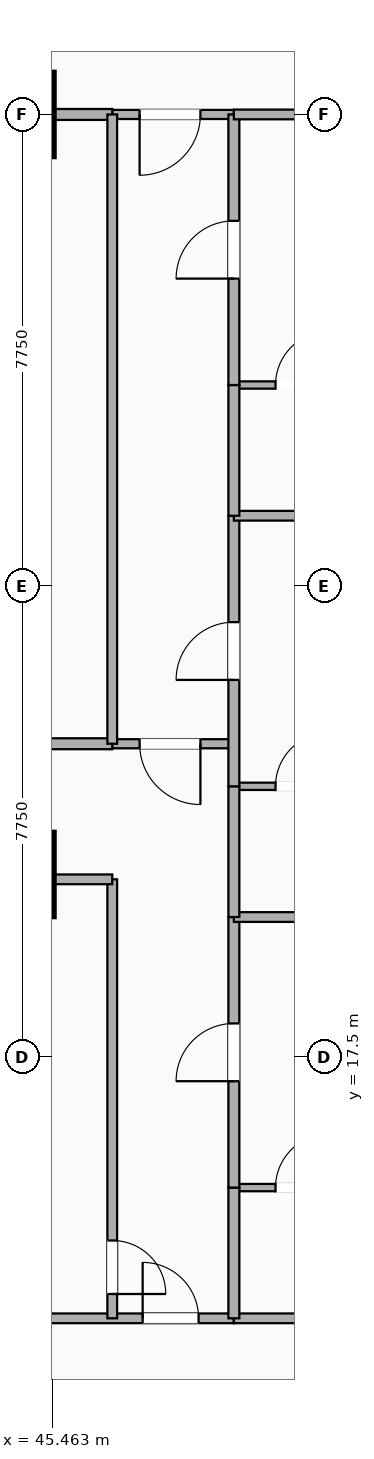
"""IFC4 building model, lengths in metres.
Left out: names, types, materials, properties, quantities, classifications, styles, units other than length and angle.
Written with IfcOpenShell. Run it as: python <this file> out.ifc"""

import sys

from ifc_helpers import new_model, si_unit, direction, frame, frame_2d, origin, origin_2d, place, context, subcontext, project, spatial, rectangle, extrude, element, fill, save


model = new_model("IFC4")
c1 = context("Model", 3, precision=1e-05, world=origin(), true_north=direction((0.0, 1.0)))
c2 = subcontext(c1, "Body", "Model", "MODEL_VIEW")
j1 = project(units=[si_unit("LENGTHUNIT", "METRE"), si_unit("PLANEANGLEUNIT", "RADIAN")], contexts=[c1])
p1 = place(None, origin())
s1 = spatial("IfcSite", under=j1, at=p1, CompositionType="ELEMENT")
p2 = place(p1, origin())
s2 = spatial("IfcBuilding", under=s1, at=p2, CompositionType="ELEMENT")
p3 = place(p2, frame((0.0, 0.0, 71.9)))
s3 = spatial("IfcBuildingStorey", under=s2, at=p3, CompositionType="ELEMENT", Elevation=71.9)
for number, where, z_axis, x_axis in (
    (1, (44.8, 20.5, -0.28), (0.0, 0.0, 1.0), (1.0, 0.0, 0.0)),
    (2, (44.8, 33.0, -0.28), (0.0, 0.0, 1.0), (1.0, 0.0, 0.0)),
):
    element("IfcColumn", number, at=place(p3, frame(where, z_axis=z_axis, x_axis=x_axis)), inside=s3, PredefinedType="COLUMN", context=c2, shape_type="SweptSolid", body=[
        extrude(rectangle(XDim=1.4, YDim=1.4, at=origin_2d()), origin(), (0.0, 0.0, 1.0), 3.46),
    ])
p4 = place(p3, frame((44.8, 13.2, 0.0), z_axis=(0.0, 0.0, 1.0), x_axis=(1.0, 0.0, 0.0)))
e3 = element("IfcWall", 3, at=p4, inside=s3, PredefinedType="PARTITIONING", context=c2, shape_type="SweptSolid", body=[
    extrude(rectangle(XDim=3.65, YDim=0.16, at=frame_2d((1.825, 0.0))), origin(), (0.0, 0.0, 1.0), 2.47),
])
p5 = place(p4, frame((3.07, 0.0, 0.0), z_axis=(0.0, 0.0, 1.0), x_axis=(-1.0, 0.0, 0.0)))
e4 = element("IfcOpeningElement", 4, at=p5, cuts=e3, PredefinedType="OPENING", context=c2, shape_type="SweptSolid", body=[
    extrude(rectangle(XDim=0.92, YDim=2.08, at=frame_2d((0.46, 1.04))), frame((0.0, 0.09, 0.0), z_axis=(0.0, -1.0, 0.0), x_axis=(1.0, 0.0, 0.0)), (0.0, 0.0, 1.0), 0.18),
])
p6 = place(p3, frame((46.45, 13.2, 0.0), z_axis=(0.0, 0.0, 1.0), x_axis=(0.0, 1.0, 0.0)))
e5 = element("IfcWall", 5, at=p6, inside=s3, PredefinedType="PARTITIONING", context=c2, shape_type="SweptSolid", body=[
    extrude(rectangle(XDim=7.22, YDim=0.16, at=frame_2d((3.61, 0.0))), origin(), (0.0, 0.0, 1.0), 2.47),
])
p7 = place(p6, frame((0.4, 0.0, 0.0)))
e6 = element("IfcOpeningElement", 6, at=p7, cuts=e5, PredefinedType="OPENING", context=c2, shape_type="SweptSolid", body=[
    extrude(rectangle(XDim=0.88, YDim=2.08, at=frame_2d((0.44, 1.04))), frame((0.0, 0.09, 0.0), z_axis=(0.0, -1.0, 0.0), x_axis=(1.0, 0.0, 0.0)), (0.0, 0.0, 1.0), 0.18),
])
p8 = place(p3, frame((44.8, 20.42, 0.0), z_axis=(0.0, 0.0, 1.0), x_axis=(1.0, 0.0, 0.0)))
e7 = element("IfcWall", 7, at=p8, inside=s3, PredefinedType="PARTITIONING", context=c2, shape_type="SweptSolid", body=[
    extrude(rectangle(XDim=1.65, YDim=0.16, at=frame_2d((0.825, 0.0))), origin(), (0.0, 0.0, 1.0), 2.47),
])
p9 = place(p3, frame((46.45, 22.65, 0.0), z_axis=(0.0, 0.0, 1.0), x_axis=(1.0, 0.0, 0.0)))
e8 = element("IfcWall", 8, at=p9, inside=s3, PredefinedType="PARTITIONING", context=c2, shape_type="SweptSolid", body=[
    extrude(rectangle(XDim=2.0, YDim=0.15, at=frame_2d((1.0, 0.0))), origin(), (0.0, 0.0, 1.0), 3.18),
])
p10 = place(p9, frame((0.45, 0.0, 0.0)))
e9 = element("IfcOpeningElement", 9, at=p10, cuts=e8, PredefinedType="OPENING", context=c2, shape_type="SweptSolid", body=[
    extrude(rectangle(XDim=1.0, YDim=2.15, at=frame_2d((0.5, 1.075))), frame((0.0, 0.085, 0.0), z_axis=(0.0, -1.0, 0.0), x_axis=(1.0, 0.0, 0.0)), (0.0, 0.0, 1.0), 0.17),
])
p11 = place(p3, frame((46.45, 33.0, 0.0), z_axis=(0.0, 0.0, 1.0), x_axis=(1.0, 0.0, 0.0)))
e10 = element("IfcWall", 10, at=p11, inside=s3, PredefinedType="PARTITIONING", context=c2, shape_type="SweptSolid", body=[
    extrude(rectangle(XDim=2.0, YDim=0.15, at=frame_2d((1.0, 0.0))), origin(), (0.0, 0.0, 1.0), 2.47),
])
p12 = place(p11, frame((0.45, 0.0, 0.0)))
e11 = element("IfcOpeningElement", 11, at=p12, cuts=e10, PredefinedType="OPENING", context=c2, shape_type="SweptSolid", body=[
    extrude(rectangle(XDim=1.0, YDim=2.15, at=frame_2d((0.5, 1.075))), frame((0.0, 0.085, 0.0), z_axis=(0.0, -1.0, 0.0), x_axis=(1.0, 0.0, 0.0)), (0.0, 0.0, 1.0), 0.17),
])
p13 = place(p3, frame((26.5, 22.65, 0.0), z_axis=(0.0, 0.0, 1.0), x_axis=(1.0, 0.0, 0.0)))
e12 = element("IfcWall", 12, at=p13, inside=s3, PredefinedType="PARTITIONING", context=c2, shape_type="SweptSolid", body=[
    extrude(rectangle(XDim=19.95, YDim=0.18, at=frame_2d((9.975, 0.0))), origin(), (0.0, 0.0, 1.0), 2.47),
])
p14 = place(p13, frame((9.5, 0.0, 0.0)))
e13 = element("IfcOpeningElement", 13, at=p14, cuts=e12, PredefinedType="OPENING", context=c2, shape_type="SweptSolid", body=[
    extrude(rectangle(XDim=0.95, YDim=2.15, at=frame_2d((0.475, 1.075))), frame((0.0, 0.1, 0.0), z_axis=(0.0, -1.0, 0.0), x_axis=(1.0, 0.0, 0.0)), (0.0, 0.0, 1.0), 0.2),
])
p15 = place(p3, frame((26.5, 33.0, 0.0), z_axis=(0.0, 0.0, 1.0), x_axis=(1.0, 0.0, 0.0)))
e14 = element("IfcWall", 14, at=p15, inside=s3, PredefinedType="PARTITIONING", context=c2, shape_type="SweptSolid", body=[
    extrude(rectangle(XDim=19.95, YDim=0.18, at=frame_2d((9.975, 0.0))), origin(), (0.0, 0.0, 1.0), 2.47),
])
p16 = place(p3, frame((46.45, 22.65, 0.0), z_axis=(0.0, 0.0, 1.0), x_axis=(0.0, 1.0, 0.0)))
e15 = element("IfcWall", 15, at=p16, inside=s3, PredefinedType="PARTITIONING", context=c2, shape_type="SweptSolid", body=[
    extrude(rectangle(XDim=10.35, YDim=0.16, at=frame_2d((5.175, 0.0))), origin(), (0.0, 0.0, 1.0), 2.47),
])
p17 = place(p3, frame((48.45, 13.2, 0.0), z_axis=(0.0, 0.0, 1.0), x_axis=(1.0, 0.0, 0.0)))
e16 = element("IfcWall", 16, at=p17, inside=s3, PredefinedType="PARTITIONING", context=c2, shape_type="SweptSolid", body=[
    extrude(rectangle(XDim=13.23, YDim=0.16, at=frame_2d((6.615, 0.0))), origin(), (0.0, 0.0, 1.0), 2.543),
])
p18 = place(p3, frame((48.45, 15.35, 0.0), z_axis=(0.0, 0.0, 1.0), x_axis=(1.0, 0.0, 0.0)))
e17 = element("IfcWall", 17, at=p18, inside=s3, PredefinedType="PARTITIONING", context=c2, shape_type="SweptSolid", body=[
    extrude(rectangle(XDim=2.25, YDim=0.12, at=frame_2d((1.125, 0.0))), origin(), (0.0, 0.0, 1.0), 3.18),
])
p19 = place(p18, frame((1.565, 0.0, 0.0), z_axis=(0.0, 0.0, 1.0), x_axis=(-1.0, 0.0, 0.0)))
e18 = element("IfcOpeningElement", 18, at=p19, cuts=e17, PredefinedType="OPENING", context=c2, shape_type="SweptSolid", body=[
    extrude(rectangle(XDim=0.88, YDim=2.08, at=frame_2d((0.44, 1.04))), frame((0.0, 0.07, 0.0), z_axis=(0.0, -1.0, 0.0), x_axis=(1.0, 0.0, 0.0)), (0.0, 0.0, 1.0), 0.14),
])
p20 = place(p3, frame((48.45, 13.2, 0.0), z_axis=(0.0, 0.0, 1.0), x_axis=(0.0, 1.0, 0.0)))
e19 = element("IfcWall", 19, at=p20, inside=s3, PredefinedType="PARTITIONING", context=c2, shape_type="SweptSolid", body=[
    extrude(rectangle(XDim=2.15, YDim=0.18, at=frame_2d((1.075, 0.0))), origin(), (0.0, 0.0, 1.0), 2.862),
])
p21 = place(p3, frame((48.45, 15.35, 0.0), z_axis=(0.0, 0.0, 1.0), x_axis=(0.0, 1.0, 0.0)))
e20 = element("IfcWall", 20, at=p21, inside=s3, PredefinedType="PARTITIONING", context=c2, shape_type="SweptSolid", body=[
    extrude(rectangle(XDim=4.45, YDim=0.18, at=frame_2d((2.225, 0.0))), origin(), (0.0, 0.0, 1.0), 2.862),
])
p22 = place(p21, frame((2.7, 0.0, 0.0), z_axis=(0.0, 0.0, 1.0), x_axis=(-1.0, 0.0, 0.0)))
e21 = element("IfcOpeningElement", 21, at=p22, cuts=e20, PredefinedType="OPENING", context=c2, shape_type="SweptSolid", body=[
    extrude(rectangle(XDim=0.95, YDim=2.15, at=frame_2d((0.475, 1.075))), frame((0.0, 0.1, 0.0), z_axis=(0.0, -1.0, 0.0), x_axis=(1.0, 0.0, 0.0)), (0.0, 0.0, 1.0), 0.2),
])
p23 = place(p3, frame((48.45, 19.8, 0.0), z_axis=(0.0, 0.0, 1.0), x_axis=(1.0, 0.0, 0.0)))
e22 = element("IfcWall", 22, at=p23, inside=s3, PredefinedType="PARTITIONING", context=c2, shape_type="SweptSolid", body=[
    extrude(rectangle(XDim=13.23, YDim=0.16, at=frame_2d((6.615, 0.0))), origin(), (0.0, 0.0, 1.0), 2.543),
])
p24 = place(p3, frame((48.45, 21.95, 0.0), z_axis=(0.0, 0.0, 1.0), x_axis=(1.0, 0.0, 0.0)))
e23 = element("IfcWall", 23, at=p24, inside=s3, PredefinedType="PARTITIONING", context=c2, shape_type="SweptSolid", body=[
    extrude(rectangle(XDim=2.25, YDim=0.12, at=frame_2d((1.125, 0.0))), origin(), (0.0, 0.0, 1.0), 3.18),
])
p25 = place(p24, frame((1.565, 0.0, 0.0), z_axis=(0.0, 0.0, 1.0), x_axis=(-1.0, 0.0, 0.0)))
e24 = element("IfcOpeningElement", 24, at=p25, cuts=e23, PredefinedType="OPENING", context=c2, shape_type="SweptSolid", body=[
    extrude(rectangle(XDim=0.88, YDim=2.08, at=frame_2d((0.44, 1.04))), frame((0.0, 0.07, 0.0), z_axis=(0.0, -1.0, 0.0), x_axis=(1.0, 0.0, 0.0)), (0.0, 0.0, 1.0), 0.14),
])
p26 = place(p3, frame((48.45, 19.8, 0.0), z_axis=(0.0, 0.0, 1.0), x_axis=(0.0, 1.0, 0.0)))
e25 = element("IfcWall", 25, at=p26, inside=s3, PredefinedType="PARTITIONING", context=c2, shape_type="SweptSolid", body=[
    extrude(rectangle(XDim=2.15, YDim=0.18, at=frame_2d((1.075, 0.0))), origin(), (0.0, 0.0, 1.0), 2.47),
])
p27 = place(p3, frame((48.45, 21.95, 0.0), z_axis=(0.0, 0.0, 1.0), x_axis=(0.0, 1.0, 0.0)))
e26 = element("IfcWall", 26, at=p27, inside=s3, PredefinedType="PARTITIONING", context=c2, shape_type="SweptSolid", body=[
    extrude(rectangle(XDim=4.45, YDim=0.18, at=frame_2d((2.225, 0.0))), origin(), (0.0, 0.0, 1.0), 2.748),
])
p28 = place(p27, frame((2.7, 0.0, 0.0), z_axis=(0.0, 0.0, 1.0), x_axis=(-1.0, 0.0, 0.0)))
e27 = element("IfcOpeningElement", 27, at=p28, cuts=e26, PredefinedType="OPENING", context=c2, shape_type="SweptSolid", body=[
    extrude(rectangle(XDim=0.95, YDim=2.15, at=frame_2d((0.475, 1.075))), frame((0.0, 0.1, 0.0), z_axis=(0.0, -1.0, 0.0), x_axis=(1.0, 0.0, 0.0)), (0.0, 0.0, 1.0), 0.2),
])
p29 = place(p3, frame((48.45, 26.4, 0.0), z_axis=(0.0, 0.0, 1.0), x_axis=(1.0, 0.0, 0.0)))
e28 = element("IfcWall", 28, at=p29, inside=s3, PredefinedType="PARTITIONING", context=c2, shape_type="SweptSolid", body=[
    extrude(rectangle(XDim=13.23, YDim=0.16, at=frame_2d((6.615, 0.0))), origin(), (0.0, 0.0, 1.0), 2.543),
])
p30 = place(p3, frame((48.45, 28.55, 0.0), z_axis=(0.0, 0.0, 1.0), x_axis=(1.0, 0.0, 0.0)))
e29 = element("IfcWall", 29, at=p30, inside=s3, PredefinedType="PARTITIONING", context=c2, shape_type="SweptSolid", body=[
    extrude(rectangle(XDim=2.25, YDim=0.12, at=frame_2d((1.125, 0.0))), origin(), (0.0, 0.0, 1.0), 3.18),
])
p31 = place(p30, frame((1.565, 0.0, 0.0), z_axis=(0.0, 0.0, 1.0), x_axis=(-1.0, 0.0, 0.0)))
e30 = element("IfcOpeningElement", 30, at=p31, cuts=e29, PredefinedType="OPENING", context=c2, shape_type="SweptSolid", body=[
    extrude(rectangle(XDim=0.88, YDim=2.08, at=frame_2d((0.44, 1.04))), frame((0.0, 0.07, 0.0), z_axis=(0.0, -1.0, 0.0), x_axis=(1.0, 0.0, 0.0)), (0.0, 0.0, 1.0), 0.14),
])
p32 = place(p3, frame((48.45, 26.4, 0.0), z_axis=(0.0, 0.0, 1.0), x_axis=(0.0, 1.0, 0.0)))
e31 = element("IfcWall", 31, at=p32, inside=s3, PredefinedType="PARTITIONING", context=c2, shape_type="SweptSolid", body=[
    extrude(rectangle(XDim=2.15, YDim=0.18, at=frame_2d((1.075, 0.0))), origin(), (0.0, 0.0, 1.0), 3.18),
])
p33 = place(p3, frame((48.45, 28.55, 0.0), z_axis=(0.0, 0.0, 1.0), x_axis=(0.0, 1.0, 0.0)))
e32 = element("IfcWall", 32, at=p33, inside=s3, PredefinedType="PARTITIONING", context=c2, shape_type="SweptSolid", body=[
    extrude(rectangle(XDim=4.45, YDim=0.18, at=frame_2d((2.225, 0.0))), origin(), (0.0, 0.0, 1.0), 2.47),
])
p34 = place(p33, frame((2.7, 0.0, 0.0), z_axis=(0.0, 0.0, 1.0), x_axis=(-1.0, 0.0, 0.0)))
e33 = element("IfcOpeningElement", 33, at=p34, cuts=e32, PredefinedType="OPENING", context=c2, shape_type="SweptSolid", body=[
    extrude(rectangle(XDim=0.95, YDim=2.15, at=frame_2d((0.475, 1.075))), frame((0.0, 0.1, 0.0), z_axis=(0.0, -1.0, 0.0), x_axis=(1.0, 0.0, 0.0)), (0.0, 0.0, 1.0), 0.2),
])
p35 = place(p3, frame((48.45, 33.0, 0.0), z_axis=(0.0, 0.0, 1.0), x_axis=(1.0, 0.0, 0.0)))
e34 = element("IfcWall", 34, at=p35, inside=s3, PredefinedType="PARTITIONING", context=c2, shape_type="SweptSolid", body=[
    extrude(rectangle(XDim=13.23, YDim=0.16, at=frame_2d((6.615, 0.0))), origin(), (0.0, 0.0, 1.0), 2.47),
])
p36 = place(p5, origin())
e35 = element("IfcDoor", 35, at=p36, inside=s3, OperationType="SINGLE_SWING_LEFT", PredefinedType="DOOR", context=c2, shape_type="SweptSolid", body=[
    extrude(rectangle(XDim=0.92, YDim=2.08, at=frame_2d((0.46, 1.04))), frame((0.0, 0.025, 0.0), z_axis=(0.0, -1.0, 0.0), x_axis=(1.0, 0.0, 0.0)), (0.0, 0.0, 1.0), 0.05),
])
fill(e4, e35)
p37 = place(p7, origin())
e36 = element("IfcDoor", 36, at=p37, inside=s3, OperationType="SINGLE_SWING_LEFT", PredefinedType="DOOR", context=c2, shape_type="SweptSolid", body=[
    extrude(rectangle(XDim=0.88, YDim=2.08, at=frame_2d((0.44, 1.04))), frame((0.0, 0.025, 0.0), z_axis=(0.0, -1.0, 0.0), x_axis=(1.0, 0.0, 0.0)), (0.0, 0.0, 1.0), 0.05),
])
fill(e6, e36)
p38 = place(p10, origin())
e37 = element("IfcDoor", 37, at=p38, inside=s3, OperationType="SINGLE_SWING_RIGHT", PredefinedType="DOOR", context=c2, shape_type="SweptSolid", body=[
    extrude(rectangle(XDim=1.0, YDim=2.15, at=frame_2d((0.5, 1.075))), frame((0.0, 0.025, 0.0), z_axis=(0.0, -1.0, 0.0), x_axis=(1.0, 0.0, 0.0)), (0.0, 0.0, 1.0), 0.05),
])
fill(e9, e37)
p39 = place(p12, origin())
e38 = element("IfcDoor", 38, at=p39, inside=s3, OperationType="SINGLE_SWING_LEFT", PredefinedType="DOOR", context=c2, shape_type="SweptSolid", body=[
    extrude(rectangle(XDim=1.0, YDim=2.15, at=frame_2d((0.5, 1.075))), frame((0.0, 0.025, 0.0), z_axis=(0.0, -1.0, 0.0), x_axis=(1.0, 0.0, 0.0)), (0.0, 0.0, 1.0), 0.05),
])
fill(e11, e38)
p40 = place(p19, origin())
e39 = element("IfcDoor", 39, at=p40, inside=s3, OperationType="SINGLE_SWING_RIGHT", PredefinedType="DOOR", context=c2, shape_type="SweptSolid", body=[
    extrude(rectangle(XDim=0.88, YDim=2.08, at=frame_2d((0.44, 1.04))), frame((0.0, 0.025, 0.0), z_axis=(0.0, -1.0, 0.0), x_axis=(1.0, 0.0, 0.0)), (0.0, 0.0, 1.0), 0.05),
])
fill(e18, e39)
p41 = place(p22, origin())
e40 = element("IfcDoor", 40, at=p41, inside=s3, OperationType="SINGLE_SWING_LEFT", PredefinedType="DOOR", context=c2, shape_type="SweptSolid", body=[
    extrude(rectangle(XDim=0.95, YDim=2.15, at=frame_2d((0.475, 1.075))), frame((0.0, 0.025, 0.0), z_axis=(0.0, -1.0, 0.0), x_axis=(1.0, 0.0, 0.0)), (0.0, 0.0, 1.0), 0.05),
])
fill(e21, e40)
p42 = place(p25, origin())
e41 = element("IfcDoor", 41, at=p42, inside=s3, OperationType="SINGLE_SWING_RIGHT", PredefinedType="DOOR", context=c2, shape_type="SweptSolid", body=[
    extrude(rectangle(XDim=0.88, YDim=2.08, at=frame_2d((0.44, 1.04))), frame((0.0, 0.025, 0.0), z_axis=(0.0, -1.0, 0.0), x_axis=(1.0, 0.0, 0.0)), (0.0, 0.0, 1.0), 0.05),
])
fill(e24, e41)
p43 = place(p28, origin())
e42 = element("IfcDoor", 42, at=p43, inside=s3, OperationType="SINGLE_SWING_LEFT", PredefinedType="DOOR", context=c2, shape_type="SweptSolid", body=[
    extrude(rectangle(XDim=0.95, YDim=2.15, at=frame_2d((0.475, 1.075))), frame((0.0, 0.025, 0.0), z_axis=(0.0, -1.0, 0.0), x_axis=(1.0, 0.0, 0.0)), (0.0, 0.0, 1.0), 0.05),
])
fill(e27, e42)
p44 = place(p31, origin())
e43 = element("IfcDoor", 43, at=p44, inside=s3, OperationType="SINGLE_SWING_RIGHT", PredefinedType="DOOR", context=c2, shape_type="SweptSolid", body=[
    extrude(rectangle(XDim=0.88, YDim=2.08, at=frame_2d((0.44, 1.04))), frame((0.0, 0.025, 0.0), z_axis=(0.0, -1.0, 0.0), x_axis=(1.0, 0.0, 0.0)), (0.0, 0.0, 1.0), 0.05),
])
fill(e30, e43)
p45 = place(p34, origin())
e44 = element("IfcDoor", 44, at=p45, inside=s3, OperationType="SINGLE_SWING_LEFT", PredefinedType="DOOR", context=c2, shape_type="SweptSolid", body=[
    extrude(rectangle(XDim=0.95, YDim=2.15, at=frame_2d((0.475, 1.075))), frame((0.0, 0.025, 0.0), z_axis=(0.0, -1.0, 0.0), x_axis=(1.0, 0.0, 0.0)), (0.0, 0.0, 1.0), 0.05),
])
fill(e33, e44)
save(model, sys.argv[1])
